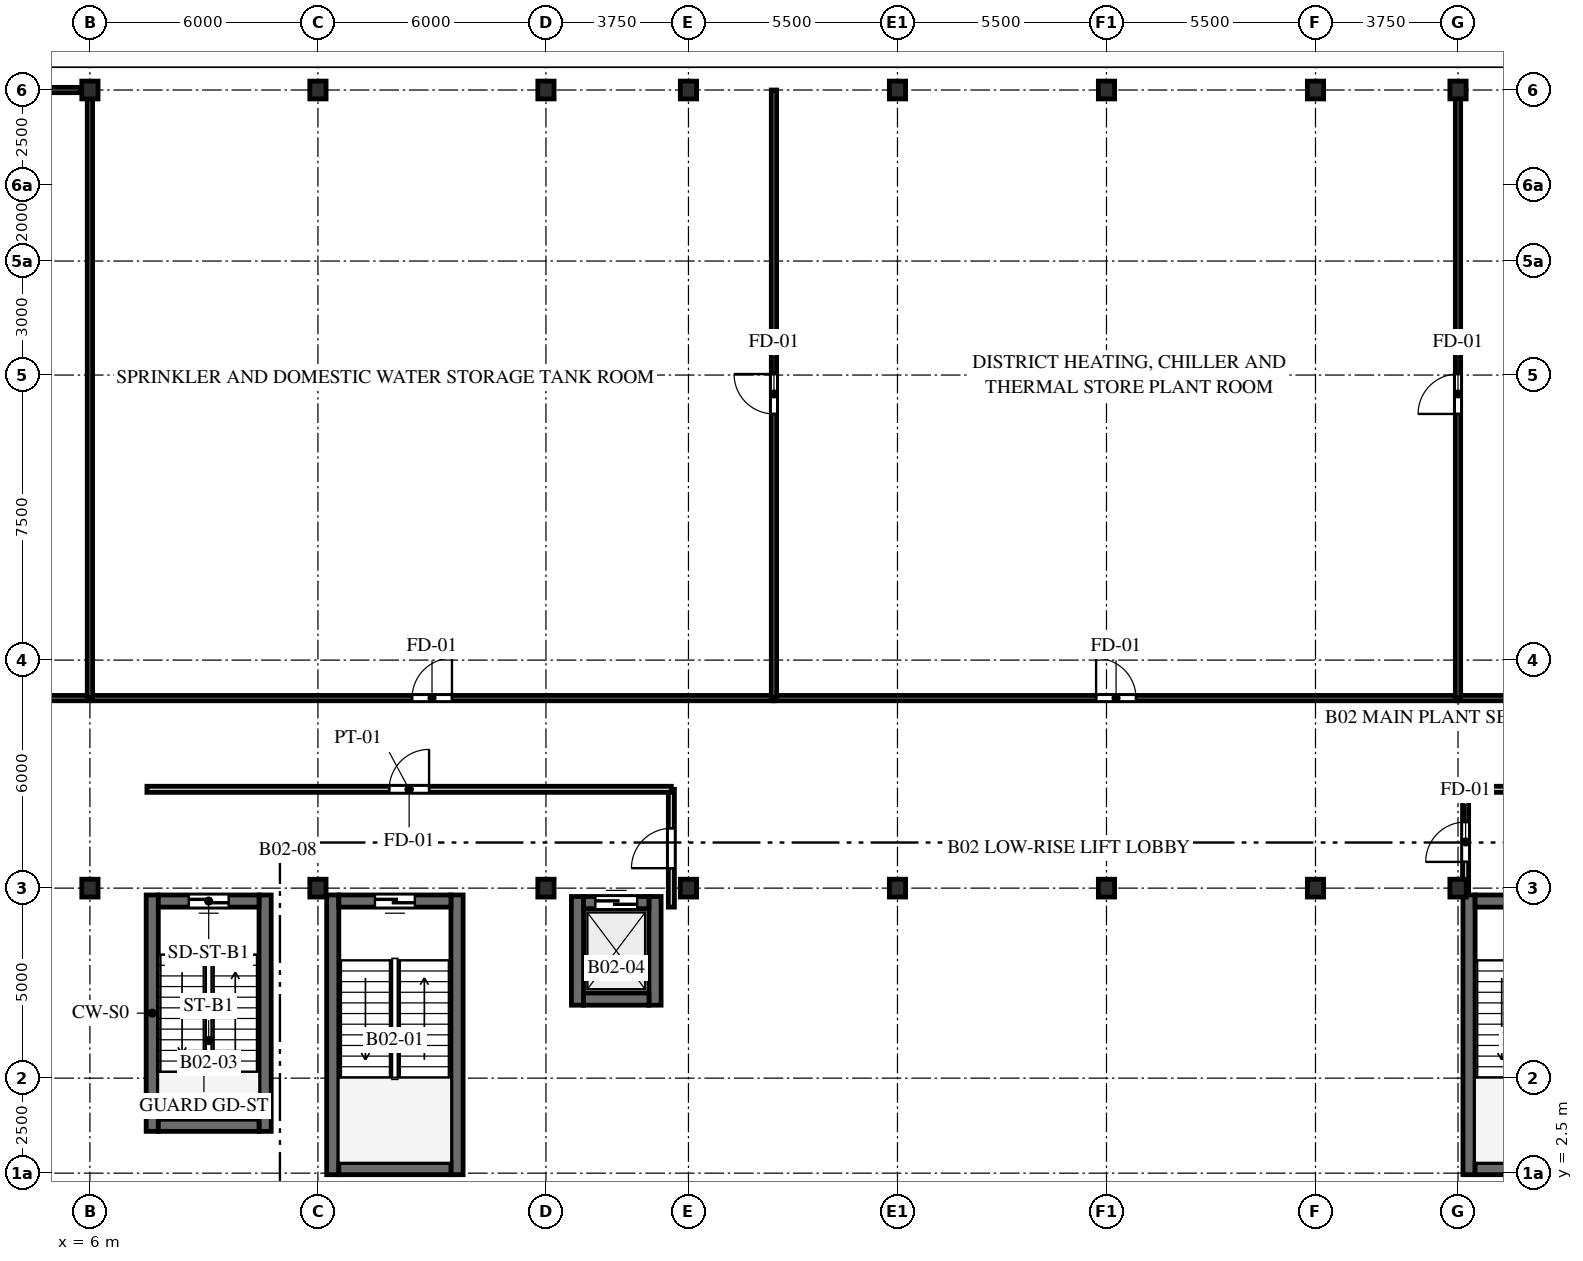
"""IFC4 building model, lengths in metres.
Left out: names, types, materials, properties, quantities, classifications, styles, units other than length and angle.
Written with IfcOpenShell. Run it as: python <this file> out.ifc"""

import sys

from ifc_helpers import new_model, si_unit, direction, frame, frame_2d, origin, origin_2d, place, context, subcontext, project, spatial, rectangle, i_section, extrude, element, fill, save


model = new_model("IFC4")
c1 = context("Model", 3, precision=1e-05, world=origin(), true_north=direction((0.0, 1.0)))
c2 = subcontext(c1, "Body", "Model", "MODEL_VIEW")
j1 = project(units=[si_unit("LENGTHUNIT", "METRE"), si_unit("PLANEANGLEUNIT", "RADIAN")], contexts=[c1])
p1 = place(None, origin())
s1 = spatial("IfcSite", under=j1, at=p1, CompositionType="ELEMENT")
p2 = place(p1, origin())
s2 = spatial("IfcBuilding", under=s1, at=p2, CompositionType="ELEMENT")
p3 = place(p2, frame((0.0, 0.0, -8.4)))
s3 = spatial("IfcBuildingStorey", under=s2, at=p3, CompositionType="ELEMENT", Elevation=-8.4)
for number, where, z_axis, x_axis in (
    (1, (6.0, 10.0, 0.0), (0.0, 0.0, 1.0), (1.0, 0.0, 0.0)),
    (2, (6.0, 31.0, 0.0), (0.0, 0.0, 1.0), (1.0, 0.0, 0.0)),
    (3, (12.0, 10.0, 0.0), (0.0, 0.0, 1.0), (1.0, 0.0, 0.0)),
    (4, (12.0, 31.0, 0.0), (0.0, 0.0, 1.0), (1.0, 0.0, 0.0)),
    (5, (18.0, 10.0, 0.0), (0.0, 0.0, 1.0), (1.0, 0.0, 0.0)),
    (6, (18.0, 31.0, 0.0), (0.0, 0.0, 1.0), (1.0, 0.0, 0.0)),
    (7, (21.75, 10.0, 0.0), (0.0, 0.0, 1.0), (1.0, 0.0, 0.0)),
    (8, (21.75, 31.0, 0.0), (0.0, 0.0, 1.0), (1.0, 0.0, 0.0)),
    (9, (27.25, 10.0, 0.0), (0.0, 0.0, 1.0), (1.0, 0.0, 0.0)),
    (10, (27.25, 31.0, 0.0), (0.0, 0.0, 1.0), (1.0, 0.0, 0.0)),
    (11, (32.75, 10.0, 0.0), (0.0, 0.0, 1.0), (1.0, 0.0, 0.0)),
    (12, (32.75, 31.0, 0.0), (0.0, 0.0, 1.0), (1.0, 0.0, 0.0)),
    (13, (38.25, 10.0, 0.0), (0.0, 0.0, 1.0), (1.0, 0.0, 0.0)),
    (14, (38.25, 31.0, 0.0), (0.0, 0.0, 1.0), (1.0, 0.0, 0.0)),
    (15, (42.0, 10.0, 0.0), (0.0, 0.0, 1.0), (1.0, 0.0, 0.0)),
    (16, (42.0, 31.0, 0.0), (0.0, 0.0, 1.0), (1.0, 0.0, 0.0)),
):
    element("IfcColumn", number, at=place(p3, frame(where, z_axis=z_axis, x_axis=x_axis)), inside=s3, PredefinedType="COLUMN", context=c2, shape_type="SweptSolid", body=[
        extrude(i_section(OverallWidth=0.428, OverallDepth=0.469, WebThickness=0.078, FlangeThickness=0.125, FilletRadius=0.015, at=origin_2d()), origin(), (0.0, 0.0, 1.0), 4.2),
    ])
for number, where, z_axis, x_axis in (
    (17, (12.39, 2.46, 0.0), (0.0, 0.0, 1.0), (0.0, 1.0, 0.0)),
    (18, (15.66, 2.46, 0.0), (0.0, 0.0, 1.0), (0.0, 1.0, 0.0)),
):
    element("IfcWall", number, at=place(p3, frame(where, z_axis=z_axis, x_axis=x_axis)), inside=s3, PredefinedType="SHEAR", context=c2, shape_type="SweptSolid", body=[
        extrude(rectangle(XDim=7.36, YDim=0.32, at=frame_2d((3.68, 0.0))), origin(), (0.0, 0.0, 1.0), 3.84),
    ])
p4 = place(p3, frame((12.55, 2.62, 0.0), z_axis=(0.0, 0.0, 1.0), x_axis=(1.0, 0.0, 0.0)))
e19 = element("IfcWall", 19, at=p4, inside=s3, PredefinedType="SHEAR", context=c2, shape_type="SweptSolid", body=[
    extrude(rectangle(XDim=2.95, YDim=0.32, at=frame_2d((1.475, 0.0))), origin(), (0.0, 0.0, 1.0), 3.84),
])
p5 = place(p3, frame((15.5, 9.66, 0.0), z_axis=(0.0, 0.0, 1.0), x_axis=(-1.0, 0.0, 0.0)))
e20 = element("IfcWall", 20, at=p5, inside=s3, PredefinedType="SHEAR", context=c2, shape_type="SweptSolid", body=[
    extrude(rectangle(XDim=2.95, YDim=0.32, at=frame_2d((1.475, 0.0))), origin(), (0.0, 0.0, 1.0), 3.84),
])
p6 = place(p5, frame((0.95, 0.0, 0.0)))
e21 = element("IfcOpeningElement", 21, at=p6, cuts=e20, PredefinedType="OPENING", context=c2, shape_type="SweptSolid", body=[
    extrude(rectangle(XDim=1.05, YDim=2.06, at=frame_2d((0.525, 1.03))), frame((0.0, 0.17, 0.0), z_axis=(0.0, -1.0, 0.0), x_axis=(1.0, 0.0, 0.0)), (0.0, 0.0, 1.0), 0.34),
])
p7 = place(p3, frame((42.29, 2.46, 0.0), z_axis=(0.0, 0.0, 1.0), x_axis=(0.0, 1.0, 0.0)))
e22 = element("IfcWall", 22, at=p7, inside=s3, PredefinedType="SHEAR", context=c2, shape_type="SweptSolid", body=[
    extrude(rectangle(XDim=7.36, YDim=0.32, at=frame_2d((3.68, 0.0))), origin(), (0.0, 0.0, 1.0), 3.84),
])
p8 = place(p3, frame((42.45, 2.62, 0.0), z_axis=(0.0, 0.0, 1.0), x_axis=(1.0, 0.0, 0.0)))
e23 = element("IfcWall", 23, at=p8, inside=s3, PredefinedType="SHEAR", context=c2, shape_type="SweptSolid", body=[
    extrude(rectangle(XDim=2.95, YDim=0.32, at=frame_2d((1.475, 0.0))), origin(), (0.0, 0.0, 1.0), 3.84),
])
p9 = place(p3, frame((45.4, 9.66, 0.0), z_axis=(0.0, 0.0, 1.0), x_axis=(-1.0, 0.0, 0.0)))
e24 = element("IfcWall", 24, at=p9, inside=s3, PredefinedType="SHEAR", context=c2, shape_type="SweptSolid", body=[
    extrude(rectangle(XDim=2.95, YDim=0.32, at=frame_2d((1.475, 0.0))), origin(), (0.0, 0.0, 1.0), 3.84),
])
p10 = place(p9, frame((0.95, 0.0, 0.0)))
e25 = element("IfcOpeningElement", 25, at=p10, cuts=e24, PredefinedType="OPENING", context=c2, shape_type="SweptSolid", body=[
    extrude(rectangle(XDim=1.05, YDim=2.06, at=frame_2d((0.525, 1.03))), frame((0.0, 0.17, 0.0), z_axis=(0.0, -1.0, 0.0), x_axis=(1.0, 0.0, 0.0)), (0.0, 0.0, 1.0), 0.34),
])
for number, where, z_axis, x_axis in (
    (26, (7.64, 3.6, 0.0), (0.0, 0.0, 1.0), (0.0, 1.0, 0.0)),
    (27, (10.61, 3.6, 0.0), (0.0, 0.0, 1.0), (0.0, 1.0, 0.0)),
):
    element("IfcWall", number, at=place(p3, frame(where, z_axis=z_axis, x_axis=x_axis)), inside=s3, PredefinedType="SHEAR", context=c2, shape_type="SweptSolid", body=[
        extrude(rectangle(XDim=6.22, YDim=0.32, at=frame_2d((3.11, 0.0))), origin(), (0.0, 0.0, 1.0), 3.84),
    ])
p11 = place(p3, frame((7.8, 3.76, 0.0), z_axis=(0.0, 0.0, 1.0), x_axis=(1.0, 0.0, 0.0)))
e28 = element("IfcWall", 28, at=p11, inside=s3, PredefinedType="SHEAR", context=c2, shape_type="SweptSolid", body=[
    extrude(rectangle(XDim=2.65, YDim=0.32, at=frame_2d((1.325, 0.0))), origin(), (0.0, 0.0, 1.0), 3.84),
])
p12 = place(p3, frame((10.45, 9.66, 0.0), z_axis=(0.0, 0.0, 1.0), x_axis=(-1.0, 0.0, 0.0)))
e29 = element("IfcWall", 29, at=p12, inside=s3, PredefinedType="SHEAR", context=c2, shape_type="SweptSolid", body=[
    extrude(rectangle(XDim=2.65, YDim=0.32, at=frame_2d((1.325, 0.0))), origin(), (0.0, 0.0, 1.0), 3.84),
])
p13 = place(p12, frame((0.8, 0.0, 0.0)))
e30 = element("IfcOpeningElement", 30, at=p13, cuts=e29, PredefinedType="OPENING", context=c2, shape_type="SweptSolid", body=[
    extrude(rectangle(XDim=1.05, YDim=2.06, at=frame_2d((0.525, 1.03))), frame((0.0, 0.17, 0.0), z_axis=(0.0, -1.0, 0.0), x_axis=(1.0, 0.0, 0.0)), (0.0, 0.0, 1.0), 0.34),
])
for number, where, z_axis, x_axis in (
    (31, (18.83, 6.92, 0.0), (0.0, 0.0, 1.0), (0.0, 1.0, 0.0)),
    (32, (20.87, 6.92, 0.0), (0.0, 0.0, 1.0), (0.0, 1.0, 0.0)),
):
    element("IfcWall", number, at=place(p3, frame(where, z_axis=z_axis, x_axis=x_axis)), inside=s3, PredefinedType="SHEAR", context=c2, shape_type="SweptSolid", body=[
        extrude(rectangle(XDim=2.86, YDim=0.32, at=frame_2d((1.43, 0.0))), origin(), (0.0, 0.0, 1.0), 3.84),
    ])
p14 = place(p3, frame((18.99, 7.08, 0.0), z_axis=(0.0, 0.0, 1.0), x_axis=(1.0, 0.0, 0.0)))
e33 = element("IfcWall", 33, at=p14, inside=s3, PredefinedType="SHEAR", context=c2, shape_type="SweptSolid", body=[
    extrude(rectangle(XDim=1.72, YDim=0.32, at=frame_2d((0.86, 0.0))), origin(), (0.0, 0.0, 1.0), 3.84),
])
p15 = place(p3, frame((18.99, 9.62, 0.0), z_axis=(0.0, 0.0, 1.0), x_axis=(1.0, 0.0, 0.0)))
e34 = element("IfcWall", 34, at=p15, inside=s3, PredefinedType="SHEAR", context=c2, shape_type="SweptSolid", body=[
    extrude(rectangle(XDim=1.72, YDim=0.32, at=frame_2d((0.86, 0.0))), origin(), (0.0, 0.0, 1.0), 3.84),
])
p16 = place(p15, frame((0.31, 0.0, 0.0)))
e35 = element("IfcOpeningElement", 35, at=p16, cuts=e34, PredefinedType="OPENING", context=c2, shape_type="SweptSolid", body=[
    extrude(rectangle(XDim=1.1, YDim=2.06, at=frame_2d((0.55, 1.03))), frame((0.0, 0.17, 0.0), z_axis=(0.0, -1.0, 0.0), x_axis=(1.0, 0.0, 0.0)), (0.0, 0.0, 1.0), 0.34),
])
p17 = place(p3, frame((21.3, 9.5, 0.0), z_axis=(0.0, 0.0, 1.0), x_axis=(0.0, 1.0, 0.0)))
e36 = element("IfcWall", 36, at=p17, inside=s3, PredefinedType="PARTITIONING", context=c2, shape_type="SweptSolid", body=[
    extrude(rectangle(XDim=3.1, YDim=0.16, at=frame_2d((1.55, 0.0))), origin(), (0.0, 0.0, 1.0), 2.894),
])
p18 = place(p17, frame((1.025, 0.0, 0.0)))
e37 = element("IfcOpeningElement", 37, at=p18, cuts=e36, PredefinedType="OPENING", context=c2, shape_type="SweptSolid", body=[
    extrude(rectangle(XDim=1.05, YDim=2.06, at=frame_2d((0.525, 1.03))), frame((0.0, 0.09, 0.0), z_axis=(0.0, -1.0, 0.0), x_axis=(1.0, 0.0, 0.0)), (0.0, 0.0, 1.0), 0.18),
])
p19 = place(p3, frame((7.5, 12.6, 0.0), z_axis=(0.0, 0.0, 1.0), x_axis=(1.0, 0.0, 0.0)))
e38 = element("IfcWall", 38, at=p19, inside=s3, PredefinedType="PARTITIONING", context=c2, shape_type="SweptSolid", body=[
    extrude(rectangle(XDim=13.8, YDim=0.16, at=frame_2d((6.9, 0.0))), origin(), (0.0, 0.0, 1.0), 2.894),
])
p20 = place(p19, frame((6.375, 0.0, 0.0)))
e39 = element("IfcOpeningElement", 39, at=p20, cuts=e38, PredefinedType="OPENING", context=c2, shape_type="SweptSolid", body=[
    extrude(rectangle(XDim=1.05, YDim=2.06, at=frame_2d((0.525, 1.03))), frame((0.0, 0.09, 0.0), z_axis=(0.0, -1.0, 0.0), x_axis=(1.0, 0.0, 0.0)), (0.0, 0.0, 1.0), 0.18),
])
p21 = place(p3, frame((42.2, 9.83, 0.0), z_axis=(0.0, 0.0, 1.0), x_axis=(0.0, 1.0, 0.0)))
e40 = element("IfcWall", 40, at=p21, inside=s3, PredefinedType="PARTITIONING", context=c2, shape_type="SweptSolid", body=[
    extrude(rectangle(XDim=2.77, YDim=0.16, at=frame_2d((1.385, 0.0))), origin(), (0.0, 0.0, 1.0), 2.894),
])
p22 = place(p21, frame((0.86, 0.0, 0.0)))
e41 = element("IfcOpeningElement", 41, at=p22, cuts=e40, PredefinedType="OPENING", context=c2, shape_type="SweptSolid", body=[
    extrude(rectangle(XDim=1.05, YDim=2.06, at=frame_2d((0.525, 1.03))), frame((0.0, 0.09, 0.0), z_axis=(0.0, -1.0, 0.0), x_axis=(1.0, 0.0, 0.0)), (0.0, 0.0, 1.0), 0.18),
])
p23 = place(p3, frame((42.2, 12.6, 0.0), z_axis=(0.0, 0.0, 1.0), x_axis=(1.0, 0.0, 0.0)))
e42 = element("IfcWall", 42, at=p23, inside=s3, PredefinedType="PARTITIONING", context=c2, shape_type="SweptSolid", body=[
    extrude(rectangle(XDim=5.8, YDim=0.16, at=frame_2d((2.9, 0.0))), origin(), (0.0, 0.0, 1.0), 2.894),
])
p24 = place(p23, frame((2.375, 0.0, 0.0)))
e43 = element("IfcOpeningElement", 43, at=p24, cuts=e42, PredefinedType="OPENING", context=c2, shape_type="SweptSolid", body=[
    extrude(rectangle(XDim=1.05, YDim=2.06, at=frame_2d((0.525, 1.03))), frame((0.0, 0.09, 0.0), z_axis=(0.0, -1.0, 0.0), x_axis=(1.0, 0.0, 0.0)), (0.0, 0.0, 1.0), 0.18),
])
p25 = place(p3, frame((-2.0, 15.0, 0.0), z_axis=(0.0, 0.0, 1.0), x_axis=(1.0, 0.0, 0.0)))
e44 = element("IfcWall", 44, at=p25, inside=s3, PredefinedType="PARTITIONING", context=c2, shape_type="SweptSolid", body=[
    extrude(rectangle(XDim=8.011, YDim=0.14, at=frame_2d((4.006, 0.0))), origin(), (0.0, 0.0, 1.0), 2.894),
])
p26 = place(p25, frame((3.481, 0.0, 0.0)))
e45 = element("IfcOpeningElement", 45, at=p26, cuts=e44, PredefinedType="OPENING", context=c2, shape_type="SweptSolid", body=[
    extrude(rectangle(XDim=1.05, YDim=2.06, at=frame_2d((0.525, 1.03))), frame((0.0, 0.08, 0.0), z_axis=(0.0, -1.0, 0.0), x_axis=(1.0, 0.0, 0.0)), (0.0, 0.0, 1.0), 0.16),
])
p27 = place(p3, frame((5.993, 15.0, 0.0), z_axis=(0.0, 0.0, 1.0), x_axis=(1.0, 0.0, 0.0)))
e46 = element("IfcWall", 46, at=p27, inside=s3, PredefinedType="PARTITIONING", context=c2, shape_type="SweptSolid", body=[
    extrude(rectangle(XDim=18.019, YDim=0.14, at=frame_2d((9.009, 0.0))), origin(), (0.0, 0.0, 1.0), 2.894),
])
p28 = place(p27, frame((8.484, 0.0, 0.0)))
e47 = element("IfcOpeningElement", 47, at=p28, cuts=e46, PredefinedType="OPENING", context=c2, shape_type="SweptSolid", body=[
    extrude(rectangle(XDim=1.05, YDim=2.06, at=frame_2d((0.525, 1.03))), frame((0.0, 0.08, 0.0), z_axis=(0.0, -1.0, 0.0), x_axis=(1.0, 0.0, 0.0)), (0.0, 0.0, 1.0), 0.16),
])
p29 = place(p3, frame((23.993, 15.0, 0.0), z_axis=(0.0, 0.0, 1.0), x_axis=(1.0, 0.0, 0.0)))
e48 = element("IfcWall", 48, at=p29, inside=s3, PredefinedType="PARTITIONING", context=c2, shape_type="SweptSolid", body=[
    extrude(rectangle(XDim=18.019, YDim=0.14, at=frame_2d((9.009, 0.0))), origin(), (0.0, 0.0, 1.0), 2.894),
])
p30 = place(p29, frame((8.484, 0.0, 0.0)))
e49 = element("IfcOpeningElement", 49, at=p30, cuts=e48, PredefinedType="OPENING", context=c2, shape_type="SweptSolid", body=[
    extrude(rectangle(XDim=1.05, YDim=2.06, at=frame_2d((0.525, 1.03))), frame((0.0, 0.08, 0.0), z_axis=(0.0, -1.0, 0.0), x_axis=(1.0, 0.0, 0.0)), (0.0, 0.0, 1.0), 0.16),
])
p31 = place(p3, frame((41.993, 15.0, 0.0), z_axis=(0.0, 0.0, 1.0), x_axis=(1.0, 0.0, 0.0)))
e50 = element("IfcWall", 50, at=p31, inside=s3, PredefinedType="PARTITIONING", context=c2, shape_type="SweptSolid", body=[
    extrude(rectangle(XDim=24.007, YDim=0.14, at=frame_2d((12.004, 0.0))), origin(), (0.0, 0.0, 1.0), 2.894),
])
p32 = place(p31, frame((11.479, 0.0, 0.0)))
e51 = element("IfcOpeningElement", 51, at=p32, cuts=e50, PredefinedType="OPENING", context=c2, shape_type="SweptSolid", body=[
    extrude(rectangle(XDim=1.05, YDim=2.06, at=frame_2d((0.525, 1.03))), frame((0.0, 0.08, 0.0), z_axis=(0.0, -1.0, 0.0), x_axis=(1.0, 0.0, 0.0)), (0.0, 0.0, 1.0), 0.16),
])
p33 = place(p3, frame((6.0, 15.004, 0.0), z_axis=(0.0, 0.0, 1.0), x_axis=(0.0, 1.0, 0.0)))
e52 = element("IfcWall", 52, at=p33, inside=s3, PredefinedType="PARTITIONING", context=c2, shape_type="SweptSolid", body=[
    extrude(rectangle(XDim=15.996, YDim=0.14, at=frame_2d((7.998, 0.0))), origin(), (0.0, 0.0, 1.0), 2.894),
])
p34 = place(p3, frame((24.0, 15.004, 0.0), z_axis=(0.0, 0.0, 1.0), x_axis=(0.0, 1.0, 0.0)))
e53 = element("IfcWall", 53, at=p34, inside=s3, PredefinedType="PARTITIONING", context=c2, shape_type="SweptSolid", body=[
    extrude(rectangle(XDim=15.996, YDim=0.14, at=frame_2d((7.998, 0.0))), origin(), (0.0, 0.0, 1.0), 3.203),
])
p35 = place(p34, frame((7.473, 0.0, 0.0)))
e54 = element("IfcOpeningElement", 54, at=p35, cuts=e53, PredefinedType="OPENING", context=c2, shape_type="SweptSolid", body=[
    extrude(rectangle(XDim=1.05, YDim=2.06, at=frame_2d((0.525, 1.03))), frame((0.0, 0.08, 0.0), z_axis=(0.0, -1.0, 0.0), x_axis=(1.0, 0.0, 0.0)), (0.0, 0.0, 1.0), 0.16),
])
p36 = place(p3, frame((42.0, 15.004, 0.0), z_axis=(0.0, 0.0, 1.0), x_axis=(0.0, 1.0, 0.0)))
e55 = element("IfcWall", 55, at=p36, inside=s3, PredefinedType="PARTITIONING", context=c2, shape_type="SweptSolid", body=[
    extrude(rectangle(XDim=15.996, YDim=0.14, at=frame_2d((7.998, 0.0))), origin(), (0.0, 0.0, 1.0), 2.894),
])
p37 = place(p36, frame((7.473, 0.0, 0.0)))
e56 = element("IfcOpeningElement", 56, at=p37, cuts=e55, PredefinedType="OPENING", context=c2, shape_type="SweptSolid", body=[
    extrude(rectangle(XDim=1.05, YDim=2.06, at=frame_2d((0.525, 1.03))), frame((0.0, 0.08, 0.0), z_axis=(0.0, -1.0, 0.0), x_axis=(1.0, 0.0, 0.0)), (0.0, 0.0, 1.0), 0.16),
])
p38 = place(p3, frame((0.05, 31.0, 0.0), z_axis=(0.0, 0.0, 1.0), x_axis=(1.0, 0.0, 0.0)))
e57 = element("IfcWall", 57, at=p38, inside=s3, PredefinedType="PARTITIONING", context=c2, shape_type="SweptSolid", body=[
    extrude(rectangle(XDim=5.71, YDim=0.14, at=frame_2d((2.855, 0.0))), origin(), (0.0, 0.0, 1.0), 3.203),
])
p39 = place(p6, origin())
e58 = element("IfcDoor", 58, at=p39, inside=s3, OperationType="SINGLE_SWING_RIGHT", PredefinedType="DOOR", context=c2, shape_type="SweptSolid", body=[
    extrude(rectangle(XDim=1.05, YDim=2.06, at=frame_2d((0.525, 1.03))), frame((0.0, 0.025, 0.0), z_axis=(0.0, -1.0, 0.0), x_axis=(1.0, 0.0, 0.0)), (0.0, 0.0, 1.0), 0.05),
])
fill(e21, e58)
p40 = place(p13, origin())
e59 = element("IfcDoor", 59, at=p40, inside=s3, OperationType="SINGLE_SWING_RIGHT", PredefinedType="DOOR", context=c2, shape_type="SweptSolid", body=[
    extrude(rectangle(XDim=1.05, YDim=2.06, at=frame_2d((0.525, 1.03))), frame((0.0, 0.025, 0.0), z_axis=(0.0, -1.0, 0.0), x_axis=(1.0, 0.0, 0.0)), (0.0, 0.0, 1.0), 0.05),
])
fill(e30, e59)
p41 = place(p16, origin())
e60 = element("IfcDoor", 60, at=p41, inside=s3, OperationType="SLIDING_TO_RIGHT", PredefinedType="DOOR", context=c2, shape_type="SweptSolid", body=[
    extrude(rectangle(XDim=1.1, YDim=2.06, at=frame_2d((0.55, 1.03))), frame((0.0, 0.025, 0.0), z_axis=(0.0, -1.0, 0.0), x_axis=(1.0, 0.0, 0.0)), (0.0, 0.0, 1.0), 0.05),
])
fill(e35, e60)
p42 = place(p18, origin())
e61 = element("IfcDoor", 61, at=p42, inside=s3, OperationType="SINGLE_SWING_LEFT", PredefinedType="DOOR", context=c2, shape_type="SweptSolid", body=[
    extrude(rectangle(XDim=1.05, YDim=2.06, at=frame_2d((0.525, 1.03))), frame((0.0, 0.025, 0.0), z_axis=(0.0, -1.0, 0.0), x_axis=(1.0, 0.0, 0.0)), (0.0, 0.0, 1.0), 0.05),
])
fill(e37, e61)
p43 = place(p20, origin())
e62 = element("IfcDoor", 62, at=p43, inside=s3, OperationType="SINGLE_SWING_RIGHT", PredefinedType="DOOR", context=c2, shape_type="SweptSolid", body=[
    extrude(rectangle(XDim=1.05, YDim=2.06, at=frame_2d((0.525, 1.03))), frame((0.0, 0.025, 0.0), z_axis=(0.0, -1.0, 0.0), x_axis=(1.0, 0.0, 0.0)), (0.0, 0.0, 1.0), 0.05),
])
fill(e39, e62)
p44 = place(p22, origin())
e63 = element("IfcDoor", 63, at=p44, inside=s3, OperationType="SINGLE_SWING_LEFT", PredefinedType="DOOR", context=c2, shape_type="SweptSolid", body=[
    extrude(rectangle(XDim=1.05, YDim=2.06, at=frame_2d((0.525, 1.03))), frame((0.0, 0.025, 0.0), z_axis=(0.0, -1.0, 0.0), x_axis=(1.0, 0.0, 0.0)), (0.0, 0.0, 1.0), 0.05),
])
fill(e41, e63)
p45 = place(p28, origin())
e64 = element("IfcDoor", 64, at=p45, inside=s3, OperationType="SINGLE_SWING_RIGHT", PredefinedType="DOOR", context=c2, shape_type="SweptSolid", body=[
    extrude(rectangle(XDim=1.05, YDim=2.06, at=frame_2d((0.525, 1.03))), frame((0.0, 0.025, 0.0), z_axis=(0.0, -1.0, 0.0), x_axis=(1.0, 0.0, 0.0)), (0.0, 0.0, 1.0), 0.05),
])
fill(e47, e64)
p46 = place(p30, origin())
e65 = element("IfcDoor", 65, at=p46, inside=s3, OperationType="SINGLE_SWING_LEFT", PredefinedType="DOOR", context=c2, shape_type="SweptSolid", body=[
    extrude(rectangle(XDim=1.05, YDim=2.06, at=frame_2d((0.525, 1.03))), frame((0.0, 0.025, 0.0), z_axis=(0.0, -1.0, 0.0), x_axis=(1.0, 0.0, 0.0)), (0.0, 0.0, 1.0), 0.05),
])
fill(e49, e65)
p47 = place(p35, origin())
e66 = element("IfcDoor", 66, at=p47, inside=s3, OperationType="SINGLE_SWING_RIGHT", PredefinedType="DOOR", context=c2, shape_type="SweptSolid", body=[
    extrude(rectangle(XDim=1.05, YDim=2.06, at=frame_2d((0.525, 1.03))), frame((0.0, 0.025, 0.0), z_axis=(0.0, -1.0, 0.0), x_axis=(1.0, 0.0, 0.0)), (0.0, 0.0, 1.0), 0.05),
])
fill(e54, e66)
p48 = place(p37, origin())
e67 = element("IfcDoor", 67, at=p48, inside=s3, OperationType="SINGLE_SWING_LEFT", PredefinedType="DOOR", context=c2, shape_type="SweptSolid", body=[
    extrude(rectangle(XDim=1.05, YDim=2.06, at=frame_2d((0.525, 1.03))), frame((0.0, 0.025, 0.0), z_axis=(0.0, -1.0, 0.0), x_axis=(1.0, 0.0, 0.0)), (0.0, 0.0, 1.0), 0.05),
])
fill(e56, e67)
save(model, sys.argv[1])
